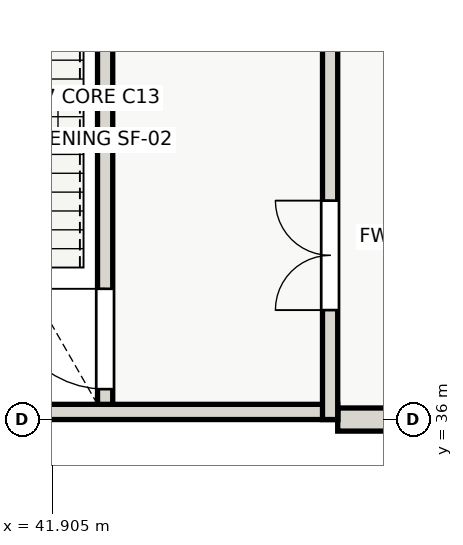
"""IFC4 building model, lengths in metres.
Left out: names, types, materials, properties, quantities, classifications, styles, units other than length and angle.
Written with IfcOpenShell. Run it as: python <this file> out.ifc"""

import sys

from ifc_helpers import new_model, si_unit, direction, frame, frame_2d, origin, place, context, subcontext, project, spatial, rectangle, extrude, element, fill, save


model = new_model("IFC4")
c1 = context("Model", 3, precision=1e-05, world=origin(), true_north=direction((0.0, 1.0)))
c2 = subcontext(c1, "Body", "Model", "MODEL_VIEW")
j1 = project(units=[si_unit("LENGTHUNIT", "METRE"), si_unit("PLANEANGLEUNIT", "RADIAN")], contexts=[c1])
p1 = place(None, origin())
s1 = spatial("IfcSite", under=j1, at=p1, CompositionType="ELEMENT")
p2 = place(p1, origin())
s2 = spatial("IfcBuilding", under=s1, at=p2, CompositionType="ELEMENT")
p3 = place(p2, frame((0.0, 0.0, 4.2)))
s3 = spatial("IfcBuildingStorey", under=s2, at=p3, CompositionType="ELEMENT", Elevation=4.2)
p4 = place(p3, frame((48.0, 36.0, 0.0), z_axis=(0.0, 0.0, 1.0), x_axis=(-1.0, 0.0, 0.0)))
e1 = element("IfcWall", 1, at=p4, inside=s3, PredefinedType="SOLIDWALL", context=c2, shape_type="SweptSolid", body=[
    extrude(rectangle(XDim=1.4, YDim=0.38, at=frame_2d((0.7, 0.0))), origin(), (0.0, 0.0, 1.0), 3.56),
])
p5 = place(p3, frame((46.6, 36.125, 0.0), z_axis=(0.0, 0.0, 1.0), x_axis=(-1.0, 0.0, 0.0)))
e2 = element("IfcWall", 2, at=p5, inside=s3, PredefinedType="SHEAR", context=c2, shape_type="SweptSolid", body=[
    extrude(rectangle(XDim=9.2, YDim=0.25, at=frame_2d((4.6, 0.0))), origin(), (0.0, 0.0, 1.0), 4.2),
])
p6 = place(p3, frame((46.475, 36.0, 0.0), z_axis=(0.0, 0.0, 1.0), x_axis=(0.0, 1.0, 0.0)))
e3 = element("IfcWall", 3, at=p6, inside=s3, PredefinedType="SHEAR", context=c2, shape_type="SweptSolid", body=[
    extrude(rectangle(XDim=9.2, YDim=0.25, at=frame_2d((4.6, 0.0))), origin(), (0.0, 0.0, 1.0), 4.2),
])
p7 = place(p6, frame((1.8, 0.0, 0.0)))
e4 = element("IfcOpeningElement", 4, at=p7, cuts=e3, PredefinedType="OPENING", context=c2, shape_type="SweptSolid", body=[
    extrude(rectangle(XDim=1.8, YDim=2.15, at=frame_2d((0.9, 1.075))), frame((0.0, 0.135, 0.0), z_axis=(0.0, -1.0, 0.0), x_axis=(1.0, 0.0, 0.0)), (0.0, 0.0, 1.0), 0.27),
])
p8 = place(p3, frame((42.775, 36.25, 0.0), z_axis=(0.0, 0.0, 1.0), x_axis=(0.0, 1.0, 0.0)))
e5 = element("IfcWall", 5, at=p8, inside=s3, PredefinedType="SHEAR", context=c2, shape_type="SweptSolid", body=[
    extrude(rectangle(XDim=8.7, YDim=0.25, at=frame_2d((4.35, 0.0))), origin(), (0.0, 0.0, 1.0), 4.2),
])
p9 = place(p8, frame((0.25, 0.0, 0.0)))
e6 = element("IfcOpeningElement", 6, at=p9, cuts=e5, PredefinedType="OPENING", context=c2, shape_type="SweptSolid", body=[
    extrude(rectangle(XDim=1.65, YDim=2.1, at=frame_2d((0.825, 1.05))), frame((0.0, 0.135, 0.0), z_axis=(0.0, -1.0, 0.0), x_axis=(1.0, 0.0, 0.0)), (0.0, 0.0, 1.0), 0.27),
])
p10 = place(p7, origin())
e7 = element("IfcDoor", 7, at=p10, inside=s3, OperationType="DOUBLE_DOOR_SINGLE_SWING", PredefinedType="DOOR", context=c2, shape_type="SweptSolid", body=[
    extrude(rectangle(XDim=1.8, YDim=2.15, at=frame_2d((0.9, 1.075))), frame((0.0, 0.025, 0.0), z_axis=(0.0, -1.0, 0.0), x_axis=(1.0, 0.0, 0.0)), (0.0, 0.0, 1.0), 0.05),
])
fill(e4, e7)
p11 = place(p9, origin())
e8 = element("IfcDoor", 8, at=p11, inside=s3, OperationType="SINGLE_SWING_RIGHT", PredefinedType="DOOR", context=c2, shape_type="SweptSolid", body=[
    extrude(rectangle(XDim=1.65, YDim=2.1, at=frame_2d((0.825, 1.05))), frame((0.0, 0.025, 0.0), z_axis=(0.0, -1.0, 0.0), x_axis=(1.0, 0.0, 0.0)), (0.0, 0.0, 1.0), 0.05),
])
fill(e6, e8)
save(model, sys.argv[1])
